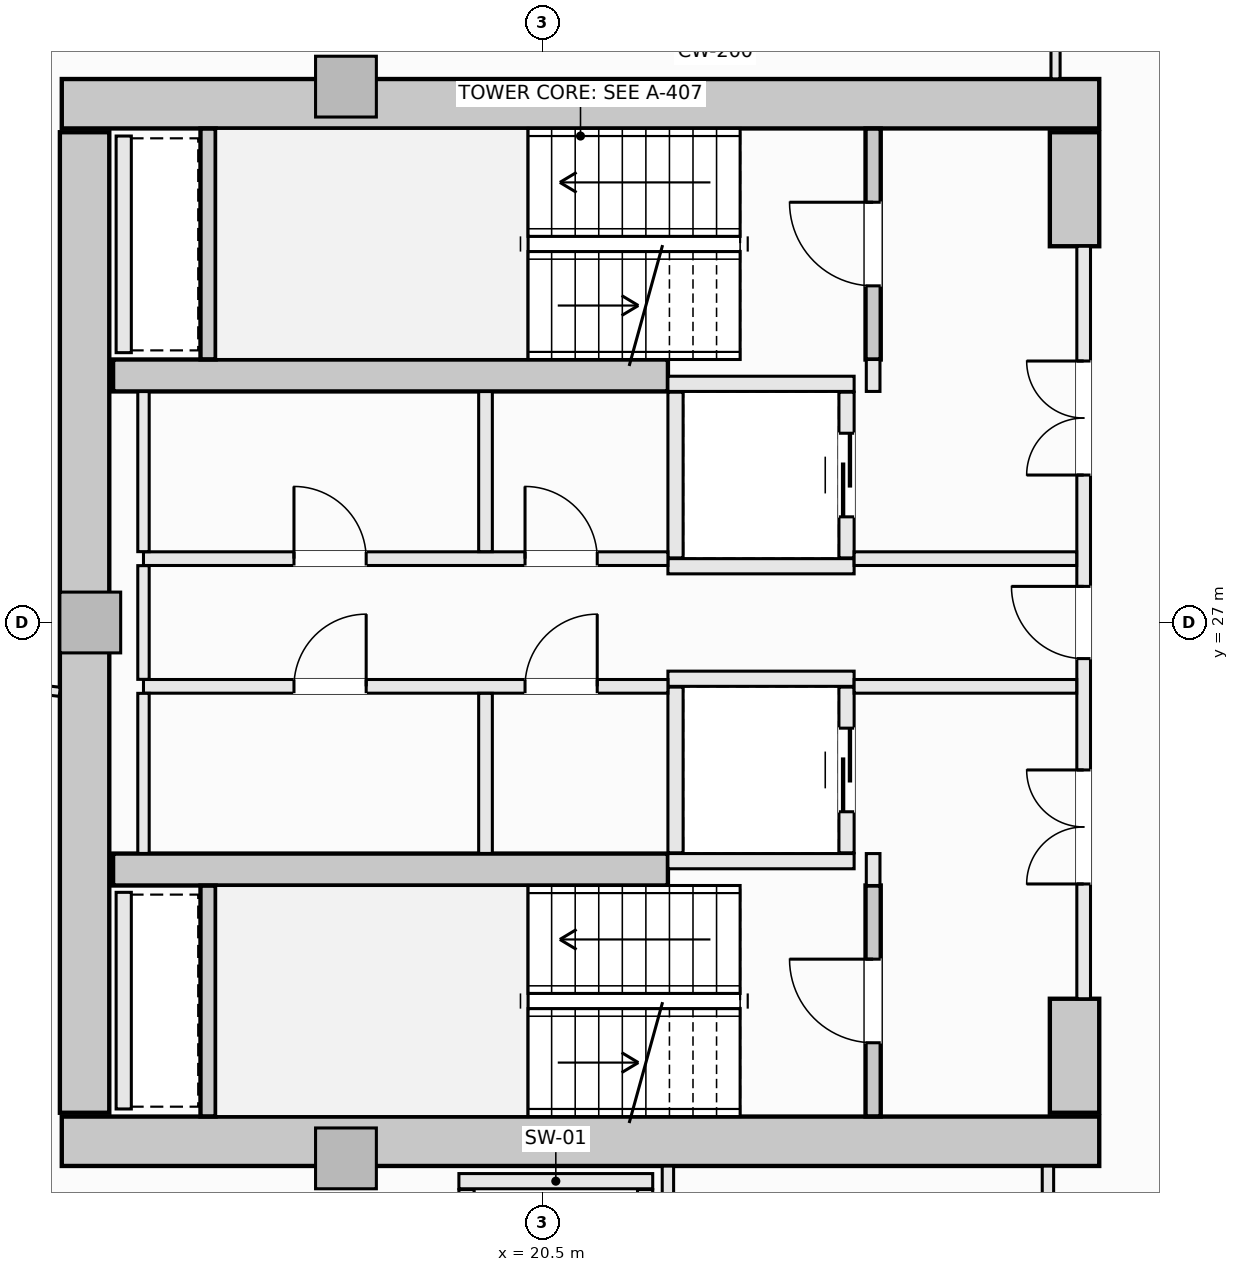
"""IFC4 building model, lengths in metres.
Left out: names, types, materials, properties, quantities, classifications, styles, units other than length and angle.
Written with IfcOpenShell. Run it as: python <this file> out.ifc"""

import sys

from ifc_helpers import new_model, si_unit, direction, frame, frame_2d, origin, origin_2d, place, context, subcontext, project, spatial, rectangle, extrude, element, fill, save


model = new_model("IFC4")
c1 = context("Model", 3, precision=1e-05, world=origin(), true_north=direction((0.0, 1.0)))
c2 = subcontext(c1, "Body", "Model", "MODEL_VIEW")
j1 = project(units=[si_unit("LENGTHUNIT", "METRE"), si_unit("PLANEANGLEUNIT", "RADIAN")], contexts=[c1])
p1 = place(None, origin())
s1 = spatial("IfcSite", under=j1, at=p1, CompositionType="ELEMENT")
p2 = place(p1, origin())
s2 = spatial("IfcBuilding", under=s1, at=p2, CompositionType="ELEMENT")
p3 = place(p2, frame((0.0, 0.0, 115.5)))
s3 = spatial("IfcBuildingStorey", under=s2, at=p3, CompositionType="ELEMENT", Elevation=115.5)
for number, where, z_axis, x_axis in (
    (1, (14.175, 33.825, -0.27), (0.0, 0.0, 1.0), (1.0, 0.0, 0.0)),
    (2, (14.175, 20.175, -0.27), (0.0, 0.0, 1.0), (1.0, 0.0, 0.0)),
):
    element("IfcWall", number, at=place(p3, frame(where, z_axis=z_axis, x_axis=x_axis)), inside=s3, PredefinedType="SHEAR", context=c2, shape_type="SweptSolid", body=[
        extrude(rectangle(XDim=13.65, YDim=0.65, at=frame_2d((6.825, 0.0))), origin(), (0.0, 0.0, 1.0), 3.4),
    ])
p4 = place(p3, frame((14.475, 20.55, -0.27), z_axis=(0.0, 0.0, 1.0), x_axis=(0.0, 1.0, 0.0)))
e3 = element("IfcWall", 3, at=p4, inside=s3, PredefinedType="SHEAR", context=c2, shape_type="SweptSolid", body=[
    extrude(rectangle(XDim=12.9, YDim=0.65, at=frame_2d((6.45, 0.0))), origin(), (0.0, 0.0, 1.0), 3.4),
])
for number, where, z_axis, x_axis in (
    (4, (27.5, 31.95, -0.27), (0.0, 0.0, 1.0), (0.0, 1.0, 0.0)),
    (5, (27.5, 20.55, -0.27), (0.0, 0.0, 1.0), (0.0, 1.0, 0.0)),
):
    element("IfcWall", number, at=place(p3, frame(where, z_axis=z_axis, x_axis=x_axis)), inside=s3, PredefinedType="SHEAR", context=c2, shape_type="SweptSolid", body=[
        extrude(rectangle(XDim=1.5, YDim=0.65, at=frame_2d((0.75, 0.0))), origin(), (0.0, 0.0, 1.0), 3.4),
    ])
for number, where, z_axis, x_axis in (
    (6, (14.85, 30.25, -0.27), (0.0, 0.0, 1.0), (1.0, 0.0, 0.0)),
    (7, (14.85, 23.75, -0.27), (0.0, 0.0, 1.0), (1.0, 0.0, 0.0)),
):
    element("IfcWall", number, at=place(p3, frame(where, z_axis=z_axis, x_axis=x_axis)), inside=s3, PredefinedType="SHEAR", context=c2, shape_type="SweptSolid", body=[
        extrude(rectangle(XDim=7.3, YDim=0.42, at=frame_2d((3.65, 0.0))), origin(), (0.0, 0.0, 1.0), 3.4),
    ])
for number, where, z_axis, x_axis in (
    (8, (17.914, 34.05, -0.27), (0.0, 0.0, 1.0), (1.0, 0.0, 0.0)),
    (9, (14.55, 27.0, -0.27), (0.0, 0.0, 1.0), (1.0, 0.0, 0.0)),
    (10, (17.914, 19.95, -0.27), (0.0, 0.0, 1.0), (1.0, 0.0, 0.0)),
):
    element("IfcColumn", number, at=place(p3, frame(where, z_axis=z_axis, x_axis=x_axis)), inside=s3, PredefinedType="PILASTER", context=c2, shape_type="SweptSolid", body=[
        extrude(rectangle(XDim=0.8, YDim=0.8, at=origin_2d()), origin(), (0.0, 0.0, 1.0), 3.4),
    ])
p5 = place(p3, frame((24.85, 30.46, -0.27), z_axis=(0.0, 0.0, 1.0), x_axis=(0.0, 1.0, 0.0)))
e11 = element("IfcWall", 11, at=p5, inside=s3, PredefinedType="SHEAR", context=c2, shape_type="SweptSolid", body=[
    extrude(rectangle(XDim=3.038, YDim=0.2, at=frame_2d((1.519, 0.0))), origin(), (0.0, 0.0, 1.0), 3.4),
])
p6 = place(p5, frame((0.969, 0.0, 0.27)))
e12 = element("IfcOpeningElement", 12, at=p6, cuts=e11, PredefinedType="OPENING", context=c2, shape_type="SweptSolid", body=[
    extrude(rectangle(XDim=1.1, YDim=2.15, at=frame_2d((0.55, 1.075))), frame((0.0, 0.11, 0.0), z_axis=(0.0, -1.0, 0.0), x_axis=(1.0, 0.0, 0.0)), (0.0, 0.0, 1.0), 0.22),
])
p7 = place(p3, frame((16.1, 30.462, -0.27), z_axis=(0.0, 0.0, 1.0), x_axis=(0.0, 1.0, 0.0)))
e13 = element("IfcWall", 13, at=p7, inside=s3, PredefinedType="SHEAR", context=c2, shape_type="SweptSolid", body=[
    extrude(rectangle(XDim=3.036, YDim=0.2, at=frame_2d((1.518, 0.0))), origin(), (0.0, 0.0, 1.0), 3.4),
])
p8 = place(p3, frame((24.85, 20.502, -0.27), z_axis=(0.0, 0.0, 1.0), x_axis=(0.0, 1.0, 0.0)))
e14 = element("IfcWall", 14, at=p8, inside=s3, PredefinedType="SHEAR", context=c2, shape_type="SweptSolid", body=[
    extrude(rectangle(XDim=3.038, YDim=0.2, at=frame_2d((1.519, 0.0))), origin(), (0.0, 0.0, 1.0), 3.4),
])
p9 = place(p8, frame((0.969, 0.0, 0.27)))
e15 = element("IfcOpeningElement", 15, at=p9, cuts=e14, PredefinedType="OPENING", context=c2, shape_type="SweptSolid", body=[
    extrude(rectangle(XDim=1.1, YDim=2.15, at=frame_2d((0.55, 1.075))), frame((0.0, 0.11, 0.0), z_axis=(0.0, -1.0, 0.0), x_axis=(1.0, 0.0, 0.0)), (0.0, 0.0, 1.0), 0.22),
])
p10 = place(p3, frame((16.1, 20.502, -0.27), z_axis=(0.0, 0.0, 1.0), x_axis=(0.0, 1.0, 0.0)))
e16 = element("IfcWall", 16, at=p10, inside=s3, PredefinedType="SHEAR", context=c2, shape_type="SweptSolid", body=[
    extrude(rectangle(XDim=3.036, YDim=0.2, at=frame_2d((1.518, 0.0))), origin(), (0.0, 0.0, 1.0), 3.4),
])
for number, where, z_axis, x_axis in (
    (17, (22.15, 30.14, 0.0), (0.0, 0.0, 1.0), (1.0, 0.0, 0.0)),
    (18, (22.15, 27.74, 0.0), (0.0, 0.0, 1.0), (1.0, 0.0, 0.0)),
):
    element("IfcWall", number, at=place(p3, frame(where, z_axis=z_axis, x_axis=x_axis)), inside=s3, PredefinedType="SOLIDWALL", context=c2, shape_type="SweptSolid", body=[
        extrude(rectangle(XDim=2.45, YDim=0.2, at=frame_2d((1.225, 0.0))), origin(), (0.0, 0.0, 1.0), 3.13),
    ])
p11 = place(p3, frame((22.25, 27.85, 0.0), z_axis=(0.0, 0.0, 1.0), x_axis=(0.0, 1.0, 0.0)))
e19 = element("IfcWall", 19, at=p11, inside=s3, PredefinedType="SOLIDWALL", context=c2, shape_type="SweptSolid", body=[
    extrude(rectangle(XDim=2.18, YDim=0.2, at=frame_2d((1.09, 0.0))), origin(), (0.0, 0.0, 1.0), 3.13),
])
p12 = place(p3, frame((24.5, 27.85, 0.0), z_axis=(0.0, 0.0, 1.0), x_axis=(0.0, 1.0, 0.0)))
e20 = element("IfcWall", 20, at=p12, inside=s3, PredefinedType="SOLIDWALL", context=c2, shape_type="SweptSolid", body=[
    extrude(rectangle(XDim=2.18, YDim=0.2, at=frame_2d((1.09, 0.0))), origin(), (0.0, 0.0, 1.0), 3.13),
])
p13 = place(p12, frame((0.54, 0.0, 0.0)))
e21 = element("IfcOpeningElement", 21, at=p13, cuts=e20, PredefinedType="OPENING", context=c2, shape_type="SweptSolid", body=[
    extrude(rectangle(XDim=1.1, YDim=2.2, at=frame_2d((0.55, 1.1))), frame((0.0, 0.11, 0.0), z_axis=(0.0, -1.0, 0.0), x_axis=(1.0, 0.0, 0.0)), (0.0, 0.0, 1.0), 0.22),
])
for number, where, z_axis, x_axis in (
    (22, (22.15, 26.26, 0.0), (0.0, 0.0, 1.0), (1.0, 0.0, 0.0)),
    (23, (22.15, 23.86, 0.0), (0.0, 0.0, 1.0), (1.0, 0.0, 0.0)),
):
    element("IfcWall", number, at=place(p3, frame(where, z_axis=z_axis, x_axis=x_axis)), inside=s3, PredefinedType="SOLIDWALL", context=c2, shape_type="SweptSolid", body=[
        extrude(rectangle(XDim=2.45, YDim=0.2, at=frame_2d((1.225, 0.0))), origin(), (0.0, 0.0, 1.0), 3.13),
    ])
p14 = place(p3, frame((22.25, 23.97, 0.0), z_axis=(0.0, 0.0, 1.0), x_axis=(0.0, 1.0, 0.0)))
e24 = element("IfcWall", 24, at=p14, inside=s3, PredefinedType="SOLIDWALL", context=c2, shape_type="SweptSolid", body=[
    extrude(rectangle(XDim=2.18, YDim=0.2, at=frame_2d((1.09, 0.0))), origin(), (0.0, 0.0, 1.0), 3.13),
])
p15 = place(p3, frame((24.5, 23.97, 0.0), z_axis=(0.0, 0.0, 1.0), x_axis=(0.0, 1.0, 0.0)))
e25 = element("IfcWall", 25, at=p15, inside=s3, PredefinedType="SOLIDWALL", context=c2, shape_type="SweptSolid", body=[
    extrude(rectangle(XDim=2.18, YDim=0.2, at=frame_2d((1.09, 0.0))), origin(), (0.0, 0.0, 1.0), 3.13),
])
p16 = place(p15, frame((0.54, 0.0, 0.0)))
e26 = element("IfcOpeningElement", 26, at=p16, cuts=e25, PredefinedType="OPENING", context=c2, shape_type="SweptSolid", body=[
    extrude(rectangle(XDim=1.1, YDim=2.2, at=frame_2d((0.55, 1.1))), frame((0.0, 0.11, 0.0), z_axis=(0.0, -1.0, 0.0), x_axis=(1.0, 0.0, 0.0)), (0.0, 0.0, 1.0), 0.22),
])
p17 = place(p3, frame((19.4, 19.65, 0.0), z_axis=(0.0, 0.0, 1.0), x_axis=(1.0, 0.0, 0.0)))
e27 = element("IfcWall", 27, at=p17, inside=s3, PredefinedType="SOLIDWALL", context=c2, shape_type="SweptSolid", body=[
    extrude(rectangle(XDim=2.55, YDim=0.2, at=frame_2d((1.275, 0.0))), origin(), (0.0, 0.0, 1.0), 3.13),
])
for number, where, z_axis, x_axis in (
    (28, (19.5, 17.01, 0.0), (0.0, 0.0, 1.0), (0.0, 1.0, 0.0)),
    (29, (21.85, 17.01, 0.0), (0.0, 0.0, 1.0), (0.0, 1.0, 0.0)),
):
    element("IfcWall", number, at=place(p3, frame(where, z_axis=z_axis, x_axis=x_axis)), inside=s3, PredefinedType="SOLIDWALL", context=c2, shape_type="SweptSolid", body=[
        extrude(rectangle(XDim=2.53, YDim=0.2, at=frame_2d((1.265, 0.0))), origin(), (0.0, 0.0, 1.0), 3.13),
    ])
for number, where, z_axis, x_axis in (
    (30, (14.99, 30.55, 0.0), (0.0, 0.0, 1.0), (0.0, 1.0, 0.0)),
    (31, (14.99, 20.6, 0.0), (0.0, 0.0, 1.0), (0.0, 1.0, 0.0)),
):
    element("IfcWall", number, at=place(p3, frame(where, z_axis=z_axis, x_axis=x_axis)), inside=s3, PredefinedType="SOLIDWALL", context=c2, shape_type="SweptSolid", body=[
        extrude(rectangle(XDim=2.85, YDim=0.2, at=frame_2d((1.425, 0.0))), origin(), (0.0, 0.0, 1.0), 3.13),
    ])
for number, where, z_axis, x_axis in (
    (32, (24.85, 23.54, 0.0), (0.0, 0.0, 1.0), (0.0, 1.0, 0.0)),
    (33, (24.85, 30.04, 0.0), (0.0, 0.0, 1.0), (0.0, 1.0, 0.0)),
):
    element("IfcWall", number, at=place(p3, frame(where, z_axis=z_axis, x_axis=x_axis)), inside=s3, PredefinedType="SOLIDWALL", context=c2, shape_type="SweptSolid", body=[
        extrude(rectangle(XDim=0.42, YDim=0.18, at=frame_2d((0.21, 0.0))), origin(), (0.0, 0.0, 1.0), 3.13),
    ])
p18 = place(p3, frame((27.62, 22.05, 0.0), z_axis=(0.0, 0.0, 1.0), x_axis=(0.0, 1.0, 0.0)))
e34 = element("IfcWall", 34, at=p18, inside=s3, PredefinedType="SOLIDWALL", context=c2, shape_type="SweptSolid", body=[
    extrude(rectangle(XDim=9.9, YDim=0.18, at=frame_2d((4.95, 0.0))), origin(), (0.0, 0.0, 1.0), 3.13),
])
p19 = place(p18, frame((4.475, 0.0, 0.0)))
e35 = element("IfcOpeningElement", 35, at=p19, cuts=e34, PredefinedType="OPENING", context=c2, shape_type="SweptSolid", body=[
    extrude(rectangle(XDim=0.95, YDim=2.1, at=frame_2d((0.475, 1.05))), frame((0.0, 0.1, 0.0), z_axis=(0.0, -1.0, 0.0), x_axis=(1.0, 0.0, 0.0)), (0.0, 0.0, 1.0), 0.2),
])
p20 = place(p18, frame((6.89, 0.0, 0.0)))
e36 = element("IfcOpeningElement", 36, at=p20, cuts=e34, PredefinedType="OPENING", context=c2, shape_type="SweptSolid", body=[
    extrude(rectangle(XDim=1.5, YDim=2.2, at=frame_2d((0.75, 1.1))), frame((0.0, 0.1, 0.0), z_axis=(0.0, -1.0, 0.0), x_axis=(1.0, 0.0, 0.0)), (0.0, 0.0, 1.0), 0.2),
])
p21 = place(p18, frame((1.51, 0.0, 0.0)))
e37 = element("IfcOpeningElement", 37, at=p21, cuts=e34, PredefinedType="OPENING", context=c2, shape_type="SweptSolid", body=[
    extrude(rectangle(XDim=1.5, YDim=2.2, at=frame_2d((0.75, 1.1))), frame((0.0, 0.1, 0.0), z_axis=(0.0, -1.0, 0.0), x_axis=(1.0, 0.0, 0.0)), (0.0, 0.0, 1.0), 0.2),
])
p22 = place(p3, frame((15.25, 27.84, 0.0), z_axis=(0.0, 0.0, 1.0), x_axis=(1.0, 0.0, 0.0)))
e38 = element("IfcWall", 38, at=p22, inside=s3, PredefinedType="SOLIDWALL", context=c2, shape_type="SweptSolid", body=[
    extrude(rectangle(XDim=6.9, YDim=0.18, at=frame_2d((3.45, 0.0))), origin(), (0.0, 0.0, 1.0), 3.13),
])
p23 = place(p22, frame((5.02, 0.0, 0.0)))
e39 = element("IfcOpeningElement", 39, at=p23, cuts=e38, PredefinedType="OPENING", context=c2, shape_type="SweptSolid", body=[
    extrude(rectangle(XDim=0.95, YDim=2.1, at=frame_2d((0.475, 1.05))), frame((0.0, 0.1, 0.0), z_axis=(0.0, -1.0, 0.0), x_axis=(1.0, 0.0, 0.0)), (0.0, 0.0, 1.0), 0.2),
])
p24 = place(p22, frame((1.98, 0.0, 0.0)))
e40 = element("IfcOpeningElement", 40, at=p24, cuts=e38, PredefinedType="OPENING", context=c2, shape_type="SweptSolid", body=[
    extrude(rectangle(XDim=0.95, YDim=2.1, at=frame_2d((0.475, 1.05))), frame((0.0, 0.1, 0.0), z_axis=(0.0, -1.0, 0.0), x_axis=(1.0, 0.0, 0.0)), (0.0, 0.0, 1.0), 0.2),
])
p25 = place(p3, frame((24.6, 27.84, 0.0), z_axis=(0.0, 0.0, 1.0), x_axis=(1.0, 0.0, 0.0)))
e41 = element("IfcWall", 41, at=p25, inside=s3, PredefinedType="SOLIDWALL", context=c2, shape_type="SweptSolid", body=[
    extrude(rectangle(XDim=2.928, YDim=0.18, at=frame_2d((1.464, 0.0))), origin(), (0.0, 0.0, 1.0), 3.13),
])
p26 = place(p3, frame((15.25, 26.16, 0.0), z_axis=(0.0, 0.0, 1.0), x_axis=(1.0, 0.0, 0.0)))
e42 = element("IfcWall", 42, at=p26, inside=s3, PredefinedType="SOLIDWALL", context=c2, shape_type="SweptSolid", body=[
    extrude(rectangle(XDim=6.9, YDim=0.18, at=frame_2d((3.45, 0.0))), origin(), (0.0, 0.0, 1.0), 3.13),
])
p27 = place(p26, frame((5.02, 0.0, 0.0)))
e43 = element("IfcOpeningElement", 43, at=p27, cuts=e42, PredefinedType="OPENING", context=c2, shape_type="SweptSolid", body=[
    extrude(rectangle(XDim=0.95, YDim=2.1, at=frame_2d((0.475, 1.05))), frame((0.0, 0.1, 0.0), z_axis=(0.0, -1.0, 0.0), x_axis=(1.0, 0.0, 0.0)), (0.0, 0.0, 1.0), 0.2),
])
p28 = place(p26, frame((1.98, 0.0, 0.0)))
e44 = element("IfcOpeningElement", 44, at=p28, cuts=e42, PredefinedType="OPENING", context=c2, shape_type="SweptSolid", body=[
    extrude(rectangle(XDim=0.95, YDim=2.1, at=frame_2d((0.475, 1.05))), frame((0.0, 0.1, 0.0), z_axis=(0.0, -1.0, 0.0), x_axis=(1.0, 0.0, 0.0)), (0.0, 0.0, 1.0), 0.2),
])
p29 = place(p3, frame((24.6, 26.16, 0.0), z_axis=(0.0, 0.0, 1.0), x_axis=(1.0, 0.0, 0.0)))
e45 = element("IfcWall", 45, at=p29, inside=s3, PredefinedType="SOLIDWALL", context=c2, shape_type="SweptSolid", body=[
    extrude(rectangle(XDim=2.928, YDim=0.18, at=frame_2d((1.464, 0.0))), origin(), (0.0, 0.0, 1.0), 3.13),
])
p30 = place(p3, frame((15.25, 23.962, 0.0), z_axis=(0.0, 0.0, 1.0), x_axis=(0.0, 1.0, 0.0)))
e46 = element("IfcWall", 46, at=p30, inside=s3, PredefinedType="PARTITIONING", context=c2, shape_type="SweptSolid", body=[
    extrude(rectangle(XDim=2.106, YDim=0.15, at=frame_2d((1.053, 0.0))), origin(), (0.0, 0.0, 1.0), 3.13),
])
p31 = place(p3, frame((15.25, 26.252, 0.0), z_axis=(0.0, 0.0, 1.0), x_axis=(0.0, 1.0, 0.0)))
e47 = element("IfcWall", 47, at=p31, inside=s3, PredefinedType="PARTITIONING", context=c2, shape_type="SweptSolid", body=[
    extrude(rectangle(XDim=1.496, YDim=0.15, at=frame_2d((0.748, 0.0))), origin(), (0.0, 0.0, 1.0), 3.13),
])
p32 = place(p3, frame((15.25, 27.932, 0.0), z_axis=(0.0, 0.0, 1.0), x_axis=(0.0, 1.0, 0.0)))
e48 = element("IfcWall", 48, at=p32, inside=s3, PredefinedType="PARTITIONING", context=c2, shape_type="SweptSolid", body=[
    extrude(rectangle(XDim=2.106, YDim=0.15, at=frame_2d((1.053, 0.0))), origin(), (0.0, 0.0, 1.0), 3.13),
])
for number, where, z_axis, x_axis in (
    (49, (19.75, 23.962, 0.0), (0.0, 0.0, 1.0), (0.0, 1.0, 0.0)),
    (50, (19.75, 27.932, 0.0), (0.0, 0.0, 1.0), (0.0, 1.0, 0.0)),
):
    element("IfcWall", number, at=place(p3, frame(where, z_axis=z_axis, x_axis=x_axis)), inside=s3, PredefinedType="SOLIDWALL", context=c2, shape_type="SweptSolid", body=[
        extrude(rectangle(XDim=2.106, YDim=0.18, at=frame_2d((1.053, 0.0))), origin(), (0.0, 0.0, 1.0), 3.13),
    ])
p33 = place(p3, frame((22.15, 17.127, 0.0), z_axis=(0.0, 0.0, 1.0), x_axis=(0.0, 1.0, 0.0)))
e51 = element("IfcWall", 51, at=p33, inside=s3, PredefinedType="PARTITIONING", context=c2, shape_type="SweptSolid", body=[
    extrude(rectangle(XDim=2.721, YDim=0.15, at=frame_2d((1.36, 0.0))), origin(), (0.0, 0.0, 1.0), 3.13),
])
p34 = place(p3, frame((27.15, 17.127, 0.0), z_axis=(0.0, 0.0, 1.0), x_axis=(0.0, 1.0, 0.0)))
e52 = element("IfcWall", 52, at=p34, inside=s3, PredefinedType="PARTITIONING", context=c2, shape_type="SweptSolid", body=[
    extrude(rectangle(XDim=2.721, YDim=0.15, at=frame_2d((1.36, 0.0))), origin(), (0.0, 0.0, 1.0), 3.13),
])
p35 = place(p34, frame((0.885, 0.0, 0.0)))
e53 = element("IfcOpeningElement", 53, at=p35, cuts=e52, PredefinedType="OPENING", context=c2, shape_type="SweptSolid", body=[
    extrude(rectangle(XDim=0.95, YDim=2.1, at=frame_2d((0.475, 1.05))), frame((0.0, 0.085, 0.0), z_axis=(0.0, -1.0, 0.0), x_axis=(1.0, 0.0, 0.0)), (0.0, 0.0, 1.0), 0.17),
])
p36 = place(p3, frame((27.25, 34.152, 0.0), z_axis=(0.0, 0.0, 1.0), x_axis=(0.0, 1.0, 0.0)))
e54 = element("IfcWall", 54, at=p36, inside=s3, PredefinedType="PARTITIONING", context=c2, shape_type="SweptSolid", body=[
    extrude(rectangle(XDim=0.806, YDim=0.12, at=frame_2d((0.403, 0.0))), origin(), (0.0, 0.0, 1.0), 3.13),
])
p37 = place(p3, frame((6.095, 26.981, 0.0), z_axis=(0.0, 0.0, 1.0), x_axis=(0.993917127708, -0.11013057363, 0.0)))
e55 = element("IfcWall", 55, at=p37, inside=s3, PredefinedType="PARTITIONING", context=c2, shape_type="SweptSolid", body=[
    extrude(rectangle(XDim=8.103, YDim=0.12, at=frame_2d((4.051, 0.0))), origin(), (0.0, 0.0, 1.0), 2.505),
])
p38 = place(p6, origin())
e56 = element("IfcDoor", 56, at=p38, inside=s3, OperationType="SINGLE_SWING_RIGHT", PredefinedType="DOOR", context=c2, shape_type="SweptSolid", body=[
    extrude(rectangle(XDim=1.1, YDim=2.15, at=frame_2d((0.55, 1.075))), frame((0.0, 0.025, 0.0), z_axis=(0.0, -1.0, 0.0), x_axis=(1.0, 0.0, 0.0)), (0.0, 0.0, 1.0), 0.05),
])
fill(e12, e56)
p39 = place(p9, origin())
e57 = element("IfcDoor", 57, at=p39, inside=s3, OperationType="SINGLE_SWING_RIGHT", PredefinedType="DOOR", context=c2, shape_type="SweptSolid", body=[
    extrude(rectangle(XDim=1.1, YDim=2.15, at=frame_2d((0.55, 1.075))), frame((0.0, 0.025, 0.0), z_axis=(0.0, -1.0, 0.0), x_axis=(1.0, 0.0, 0.0)), (0.0, 0.0, 1.0), 0.05),
])
fill(e15, e57)
p40 = place(p13, origin())
e58 = element("IfcDoor", 58, at=p40, inside=s3, OperationType="SLIDING_TO_LEFT", PredefinedType="DOOR", context=c2, shape_type="SweptSolid", body=[
    extrude(rectangle(XDim=1.1, YDim=2.2, at=frame_2d((0.55, 1.1))), frame((0.0, 0.025, 0.0), z_axis=(0.0, -1.0, 0.0), x_axis=(1.0, 0.0, 0.0)), (0.0, 0.0, 1.0), 0.05),
])
fill(e21, e58)
p41 = place(p16, origin())
e59 = element("IfcDoor", 59, at=p41, inside=s3, OperationType="SLIDING_TO_LEFT", PredefinedType="DOOR", context=c2, shape_type="SweptSolid", body=[
    extrude(rectangle(XDim=1.1, YDim=2.2, at=frame_2d((0.55, 1.1))), frame((0.0, 0.025, 0.0), z_axis=(0.0, -1.0, 0.0), x_axis=(1.0, 0.0, 0.0)), (0.0, 0.0, 1.0), 0.05),
])
fill(e26, e59)
p42 = place(p19, origin())
e60 = element("IfcDoor", 60, at=p42, inside=s3, OperationType="SINGLE_SWING_RIGHT", PredefinedType="DOOR", context=c2, shape_type="SweptSolid", body=[
    extrude(rectangle(XDim=0.95, YDim=2.1, at=frame_2d((0.475, 1.05))), frame((0.0, 0.025, 0.0), z_axis=(0.0, -1.0, 0.0), x_axis=(1.0, 0.0, 0.0)), (0.0, 0.0, 1.0), 0.05),
])
fill(e35, e60)
p43 = place(p20, origin())
e61 = element("IfcDoor", 61, at=p43, inside=s3, OperationType="DOUBLE_DOOR_SINGLE_SWING", PredefinedType="DOOR", context=c2, shape_type="SweptSolid", body=[
    extrude(rectangle(XDim=1.5, YDim=2.2, at=frame_2d((0.75, 1.1))), frame((0.0, 0.025, 0.0), z_axis=(0.0, -1.0, 0.0), x_axis=(1.0, 0.0, 0.0)), (0.0, 0.0, 1.0), 0.05),
])
fill(e36, e61)
p44 = place(p21, origin())
e62 = element("IfcDoor", 62, at=p44, inside=s3, OperationType="DOUBLE_DOOR_SINGLE_SWING", PredefinedType="DOOR", context=c2, shape_type="SweptSolid", body=[
    extrude(rectangle(XDim=1.5, YDim=2.2, at=frame_2d((0.75, 1.1))), frame((0.0, 0.025, 0.0), z_axis=(0.0, -1.0, 0.0), x_axis=(1.0, 0.0, 0.0)), (0.0, 0.0, 1.0), 0.05),
])
fill(e37, e62)
p45 = place(p23, origin())
e63 = element("IfcDoor", 63, at=p45, inside=s3, OperationType="SINGLE_SWING_LEFT", PredefinedType="DOOR", context=c2, shape_type="SweptSolid", body=[
    extrude(rectangle(XDim=0.95, YDim=2.1, at=frame_2d((0.475, 1.05))), frame((0.0, 0.025, 0.0), z_axis=(0.0, -1.0, 0.0), x_axis=(1.0, 0.0, 0.0)), (0.0, 0.0, 1.0), 0.05),
])
fill(e39, e63)
p46 = place(p27, origin())
e64 = element("IfcDoor", 64, at=p46, inside=s3, OperationType="SINGLE_SWING_RIGHT", PredefinedType="DOOR", context=c2, shape_type="SweptSolid", body=[
    extrude(rectangle(XDim=0.95, YDim=2.1, at=frame_2d((0.475, 1.05))), frame((0.0, 0.025, 0.0), z_axis=(0.0, -1.0, 0.0), x_axis=(1.0, 0.0, 0.0)), (0.0, 0.0, 1.0), 0.05),
])
fill(e43, e64)
p47 = place(p24, origin())
e65 = element("IfcDoor", 65, at=p47, inside=s3, OperationType="SINGLE_SWING_LEFT", PredefinedType="DOOR", context=c2, shape_type="SweptSolid", body=[
    extrude(rectangle(XDim=0.95, YDim=2.1, at=frame_2d((0.475, 1.05))), frame((0.0, 0.025, 0.0), z_axis=(0.0, -1.0, 0.0), x_axis=(1.0, 0.0, 0.0)), (0.0, 0.0, 1.0), 0.05),
])
fill(e40, e65)
p48 = place(p28, origin())
e66 = element("IfcDoor", 66, at=p48, inside=s3, OperationType="SINGLE_SWING_RIGHT", PredefinedType="DOOR", context=c2, shape_type="SweptSolid", body=[
    extrude(rectangle(XDim=0.95, YDim=2.1, at=frame_2d((0.475, 1.05))), frame((0.0, 0.025, 0.0), z_axis=(0.0, -1.0, 0.0), x_axis=(1.0, 0.0, 0.0)), (0.0, 0.0, 1.0), 0.05),
])
fill(e44, e66)
save(model, sys.argv[1])
